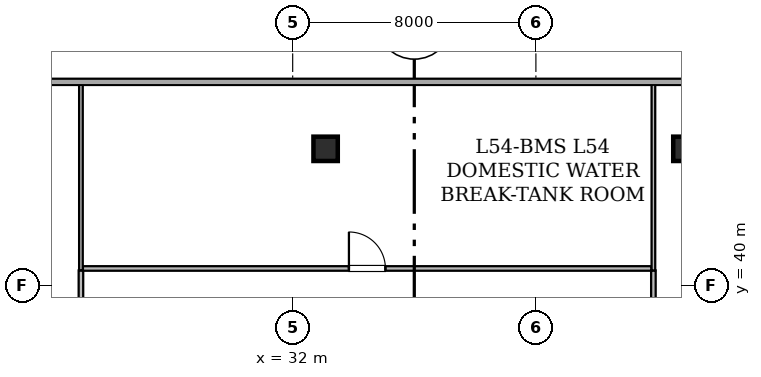
"""IFC4 building model, lengths in metres.
Left out: names, types, materials, properties, quantities, classifications, styles, units other than length and angle.
Written with IfcOpenShell. Run it as: python <this file> out.ifc"""

import sys

from ifc_helpers import new_model, si_unit, direction, frame, frame_2d, origin, origin_2d, place, context, subcontext, project, spatial, rectangle, hollow_rectangle, extrude, element, fill, save


model = new_model("IFC4")
c1 = context("Model", 3, precision=1e-05, world=origin(), true_north=direction((0.0, 1.0)))
c2 = subcontext(c1, "Body", "Model", "MODEL_VIEW")
j1 = project(units=[si_unit("LENGTHUNIT", "METRE"), si_unit("PLANEANGLEUNIT", "RADIAN")], contexts=[c1])
p1 = place(None, origin())
s1 = spatial("IfcSite", under=j1, at=p1, CompositionType="ELEMENT")
p2 = place(p1, origin())
s2 = spatial("IfcBuilding", under=s1, at=p2, CompositionType="ELEMENT")
p3 = place(p2, frame((0.0, 0.0, 211.8)))
s3 = spatial("IfcBuildingStorey", under=s2, at=p3, CompositionType="ELEMENT", Elevation=211.8)
for number, where, z_axis, x_axis in (
    (1, (33.083, 44.5, 0.0), (0.0, 0.0, 1.0), (1.0, 0.0, 0.0)),
    (2, (44.917, 44.5, 0.0), (0.0, 0.0, 1.0), (1.0, 0.0, 0.0)),
):
    element("IfcColumn", number, at=place(p3, frame(where, z_axis=z_axis, x_axis=x_axis)), inside=s3, PredefinedType="COLUMN", context=c2, shape_type="SweptSolid", body=[
        extrude(hollow_rectangle(XDim=0.8, YDim=0.8, WallThickness=0.04, at=origin_2d()), origin(), (0.0, 0.0, 1.0), 5.375),
    ])
p4 = place(p3, frame((19.102, 46.7, 0.0), z_axis=(0.0, 0.0, 1.0), x_axis=(1.0, 0.0, 0.0)))
e3 = element("IfcWall", 3, at=p4, inside=s3, PredefinedType="STANDARD", context=c2, shape_type="SweptSolid", body=[
    extrude(rectangle(XDim=39.857, YDim=0.2, at=frame_2d((19.928, 0.0))), origin(), (0.0, 0.0, 1.0), 1.15),
])
p5 = place(p3, frame((25.035, 29.314, 0.0), z_axis=(0.0, 0.0, 1.0), x_axis=(0.0, 1.0, 0.0)))
e4 = element("IfcWall", 4, at=p5, inside=s3, PredefinedType="STANDARD", context=c2, shape_type="SweptSolid", body=[
    extrude(rectangle(XDim=11.186, YDim=0.15, at=frame_2d((5.593, 0.0))), origin(), (0.0, 0.0, 1.0), 3.42),
])
p6 = place(p5, frame((4.993, 0.0, 0.0)))
e5 = element("IfcOpeningElement", 5, at=p6, cuts=e4, PredefinedType="OPENING", context=c2, shape_type="SweptSolid", body=[
    extrude(rectangle(XDim=1.2, YDim=2.15, at=frame_2d((0.6, 1.075))), frame((0.0, 0.085, 0.0), z_axis=(0.0, -1.0, 0.0), x_axis=(1.0, 0.0, 0.0)), (0.0, 0.0, 1.0), 0.17),
])
p7 = place(p3, frame((43.865, 40.5, 0.0), z_axis=(0.0, 0.0, 1.0), x_axis=(0.0, -1.0, 0.0)))
e6 = element("IfcWall", 6, at=p7, inside=s3, PredefinedType="STANDARD", context=c2, shape_type="SweptSolid", body=[
    extrude(rectangle(XDim=11.186, YDim=0.15, at=frame_2d((5.593, 0.0))), origin(), (0.0, 0.0, 1.0), 3.42),
])
p8 = place(p7, frame((4.993, 0.0, 0.0)))
e7 = element("IfcOpeningElement", 7, at=p8, cuts=e6, PredefinedType="OPENING", context=c2, shape_type="SweptSolid", body=[
    extrude(rectangle(XDim=1.2, YDim=2.15, at=frame_2d((0.6, 1.075))), frame((0.0, 0.085, 0.0), z_axis=(0.0, -1.0, 0.0), x_axis=(1.0, 0.0, 0.0)), (0.0, 0.0, 1.0), 0.17),
])
p9 = place(p3, frame((25.1, 40.565, 0.0), z_axis=(0.0, 0.0, 1.0), x_axis=(1.0, 0.0, 0.0)))
e8 = element("IfcWall", 8, at=p9, inside=s3, PredefinedType="STANDARD", context=c2, shape_type="SweptSolid", body=[
    extrude(rectangle(XDim=18.7, YDim=0.15, at=frame_2d((9.35, 0.0))), origin(), (0.0, 0.0, 1.0), 3.42),
])
p10 = place(p9, frame((8.75, 0.0, 0.0)))
e9 = element("IfcOpeningElement", 9, at=p10, cuts=e8, PredefinedType="OPENING", context=c2, shape_type="SweptSolid", body=[
    extrude(rectangle(XDim=1.2, YDim=2.15, at=frame_2d((0.6, 1.075))), frame((0.0, 0.085, 0.0), z_axis=(0.0, -1.0, 0.0), x_axis=(1.0, 0.0, 0.0)), (0.0, 0.0, 1.0), 0.17),
])
for number, where, z_axis, x_axis in (
    (10, (25.035, 46.608, 0.0), (0.0, 0.0, 1.0), (0.0, -1.0, 0.0)),
    (11, (43.865, 40.5, 0.0), (0.0, 0.0, 1.0), (0.0, 1.0, 0.0)),
):
    element("IfcWall", number, at=place(p3, frame(where, z_axis=z_axis, x_axis=x_axis)), inside=s3, PredefinedType="PARTITIONING", context=c2, shape_type="SweptSolid", body=[
        extrude(rectangle(XDim=6.108, YDim=0.12, at=frame_2d((3.054, 0.0))), origin(), (0.0, 0.0, 1.0), 3.42),
    ])
p11 = place(p10, origin())
e12 = element("IfcDoor", 12, at=p11, inside=s3, OperationType="SINGLE_SWING_LEFT", PredefinedType="DOOR", context=c2, shape_type="SweptSolid", body=[
    extrude(rectangle(XDim=1.2, YDim=2.15, at=frame_2d((0.6, 1.075))), frame((0.0, 0.025, 0.0), z_axis=(0.0, -1.0, 0.0), x_axis=(1.0, 0.0, 0.0)), (0.0, 0.0, 1.0), 0.05),
])
fill(e9, e12)
save(model, sys.argv[1])
